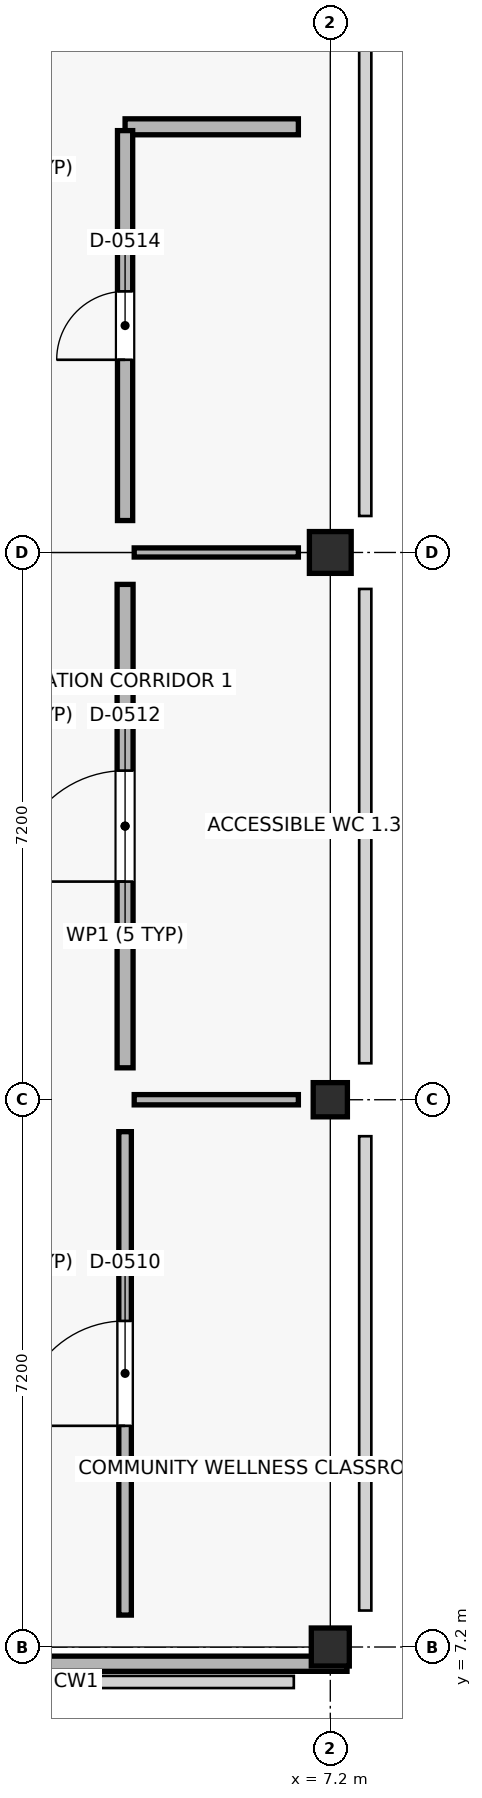
"""IFC4 building model, lengths in metres.
Left out: names, types, materials, properties, quantities, classifications, styles, units other than length and angle.
Written with IfcOpenShell. Run it as: python <this file> out.ifc"""

import sys

from ifc_helpers import new_model, si_unit, direction, frame, frame_2d, origin, origin_2d, place, context, subcontext, project, spatial, rectangle, extrude, element, fill, save


model = new_model("IFC4")
c1 = context("Model", 3, precision=1e-05, world=origin(), true_north=direction((0.0, 1.0)))
c2 = subcontext(c1, "Body", "Model", "MODEL_VIEW")
j1 = project(units=[si_unit("LENGTHUNIT", "METRE"), si_unit("PLANEANGLEUNIT", "RADIAN")], contexts=[c1])
p1 = place(None, origin())
s1 = spatial("IfcSite", under=j1, at=p1, CompositionType="ELEMENT")
p2 = place(p1, origin())
s2 = spatial("IfcBuilding", under=s1, at=p2, CompositionType="ELEMENT")
p3 = place(p2, frame((0.0, 0.0, 9.0)))
s3 = spatial("IfcBuildingStorey", under=s2, at=p3, CompositionType="ELEMENT", Elevation=9.0)
p4 = place(p3, frame((7.2, 7.2, 0.0), z_axis=(0.0, 0.0, 1.0), x_axis=(1.0, 0.0, 0.0)))
e1 = element("IfcColumn", 1, at=p4, inside=s3, PredefinedType="COLUMN", context=c2, shape_type="SweptSolid", body=[
    extrude(rectangle(XDim=0.5, YDim=0.5, at=origin_2d()), origin(), (0.0, 0.0, 1.0), 4.28),
])
p5 = place(p3, frame((7.2, 14.4, 0.0), z_axis=(0.0, 0.0, 1.0), x_axis=(1.0, 0.0, 0.0)))
e2 = element("IfcColumn", 2, at=p5, inside=s3, PredefinedType="COLUMN", context=c2, shape_type="SweptSolid", body=[
    extrude(rectangle(XDim=0.45, YDim=0.45, at=origin_2d()), origin(), (0.0, 0.0, 1.0), 4.28),
])
p6 = place(p3, frame((7.2, 21.6, 0.0), z_axis=(0.0, 0.0, 1.0), x_axis=(1.0, 0.0, 0.0)))
e3 = element("IfcColumn", 3, at=p6, inside=s3, PredefinedType="COLUMN", context=c2, shape_type="SweptSolid", body=[
    extrude(rectangle(XDim=0.55, YDim=0.55, at=origin_2d()), origin(), (0.0, 0.0, 1.0), 4.5),
])
p7 = place(p3, frame((0.0, 6.98, 0.0), z_axis=(0.0, 0.0, 1.0), x_axis=(1.0, 0.0, 0.0)))
e4 = element("IfcWall", 4, at=p7, inside=s3, PredefinedType="PARAPET", context=c2, shape_type="SweptSolid", body=[
    extrude(rectangle(XDim=7.42, YDim=0.2, at=frame_2d((3.71, 0.0))), origin(), (0.0, 0.0, 1.0), 0.95),
])
p8 = place(p3, frame((4.5, 7.62, 0.0), z_axis=(0.0, 0.0, 1.0), x_axis=(0.0, 1.0, 0.0)))
e5 = element("IfcWall", 5, at=p8, inside=s3, PredefinedType="PARTITIONING", context=c2, shape_type="SweptSolid", body=[
    extrude(rectangle(XDim=6.36, YDim=0.165, at=frame_2d((3.18, 0.0))), origin(), (0.0, 0.0, 1.0), 3.38),
])
p9 = place(p8, frame((2.49, 0.0, 0.0)))
e6 = element("IfcOpeningElement", 6, at=p9, cuts=e5, PredefinedType="OPENING", context=c2, shape_type="SweptSolid", body=[
    extrude(rectangle(XDim=1.38, YDim=2.04, at=frame_2d((0.69, 1.02))), frame((0.0, 0.093, 0.0), z_axis=(0.0, -1.0, 0.0), x_axis=(1.0, 0.0, 0.0)), (0.0, 0.0, 1.0), 0.185),
])
p10 = place(p3, frame((4.62, 14.4, 0.0), z_axis=(0.0, 0.0, 1.0), x_axis=(1.0, 0.0, 0.0)))
e7 = element("IfcWall", 7, at=p10, inside=s3, PredefinedType="PARTITIONING", context=c2, shape_type="SweptSolid", body=[
    extrude(rectangle(XDim=2.16, YDim=0.135, at=frame_2d((1.08, 0.0))), origin(), (0.0, 0.0, 1.0), 3.38),
])
p11 = place(p3, frame((4.5, 14.82, 0.0), z_axis=(0.0, 0.0, 1.0), x_axis=(0.0, 1.0, 0.0)))
e8 = element("IfcWall", 8, at=p11, inside=s3, PredefinedType="PLUMBINGWALL", context=c2, shape_type="SweptSolid", body=[
    extrude(rectangle(XDim=6.36, YDim=0.21, at=frame_2d((3.18, 0.0))), origin(), (0.0, 0.0, 1.0), 3.38),
])
p12 = place(p11, frame((2.45, 0.0, 0.0)))
e9 = element("IfcOpeningElement", 9, at=p12, cuts=e8, PredefinedType="OPENING", context=c2, shape_type="SweptSolid", body=[
    extrude(rectangle(XDim=1.46, YDim=2.04, at=frame_2d((0.73, 1.02))), frame((0.0, 0.115, 0.0), z_axis=(0.0, -1.0, 0.0), x_axis=(1.0, 0.0, 0.0)), (0.0, 0.0, 1.0), 0.23),
])
p13 = place(p3, frame((4.62, 21.6, 0.0), z_axis=(0.0, 0.0, 1.0), x_axis=(1.0, 0.0, 0.0)))
e10 = element("IfcWall", 10, at=p13, inside=s3, PredefinedType="PARTITIONING", context=c2, shape_type="SweptSolid", body=[
    extrude(rectangle(XDim=2.16, YDim=0.12, at=frame_2d((1.08, 0.0))), origin(), (0.0, 0.0, 1.0), 3.38),
])
p14 = place(p3, frame((4.5, 27.2, 0.0), z_axis=(0.0, 0.0, 1.0), x_axis=(1.0, 0.0, 0.0)))
e11 = element("IfcWall", 11, at=p14, inside=s3, PredefinedType="PLUMBINGWALL", context=c2, shape_type="SweptSolid", body=[
    extrude(rectangle(XDim=2.28, YDim=0.21, at=frame_2d((1.14, 0.0))), origin(), (0.0, 0.0, 1.0), 3.38),
])
p15 = place(p3, frame((4.5, 22.02, 0.0), z_axis=(0.0, 0.0, 1.0), x_axis=(0.0, 1.0, 0.0)))
e12 = element("IfcWall", 12, at=p15, inside=s3, PredefinedType="SOLIDWALL", context=c2, shape_type="SweptSolid", body=[
    extrude(rectangle(XDim=5.13, YDim=0.2, at=frame_2d((2.565, 0.0))), origin(), (0.0, 0.0, 1.0), 3.38),
])
p16 = place(p15, frame((2.115, 0.0, 0.0)))
e13 = element("IfcOpeningElement", 13, at=p16, cuts=e12, PredefinedType="OPENING", context=c2, shape_type="SweptSolid", body=[
    extrude(rectangle(XDim=0.9, YDim=2.09, at=frame_2d((0.45, 1.045))), frame((0.0, 0.11, 0.0), z_axis=(0.0, -1.0, 0.0), x_axis=(1.0, 0.0, 0.0)), (0.0, 0.0, 1.0), 0.22),
])
p17 = place(p9, origin())
e14 = element("IfcDoor", 14, at=p17, inside=s3, OperationType="SINGLE_SWING_LEFT", PredefinedType="DOOR", context=c2, shape_type="SweptSolid", body=[
    extrude(rectangle(XDim=1.38, YDim=2.04, at=frame_2d((0.69, 1.02))), frame((0.0, 0.025, 0.0), z_axis=(0.0, -1.0, 0.0), x_axis=(1.0, 0.0, 0.0)), (0.0, 0.0, 1.0), 0.05),
])
fill(e6, e14)
p18 = place(p12, origin())
e15 = element("IfcDoor", 15, at=p18, inside=s3, OperationType="SINGLE_SWING_LEFT", PredefinedType="DOOR", context=c2, shape_type="SweptSolid", body=[
    extrude(rectangle(XDim=1.46, YDim=2.04, at=frame_2d((0.73, 1.02))), frame((0.0, 0.025, 0.0), z_axis=(0.0, -1.0, 0.0), x_axis=(1.0, 0.0, 0.0)), (0.0, 0.0, 1.0), 0.05),
])
fill(e9, e15)
p19 = place(p16, origin())
e16 = element("IfcDoor", 16, at=p19, inside=s3, OperationType="SINGLE_SWING_LEFT", PredefinedType="DOOR", context=c2, shape_type="SweptSolid", body=[
    extrude(rectangle(XDim=0.9, YDim=2.09, at=frame_2d((0.45, 1.045))), frame((0.0, 0.025, 0.0), z_axis=(0.0, -1.0, 0.0), x_axis=(1.0, 0.0, 0.0)), (0.0, 0.0, 1.0), 0.05),
])
fill(e13, e16)
save(model, sys.argv[1])
